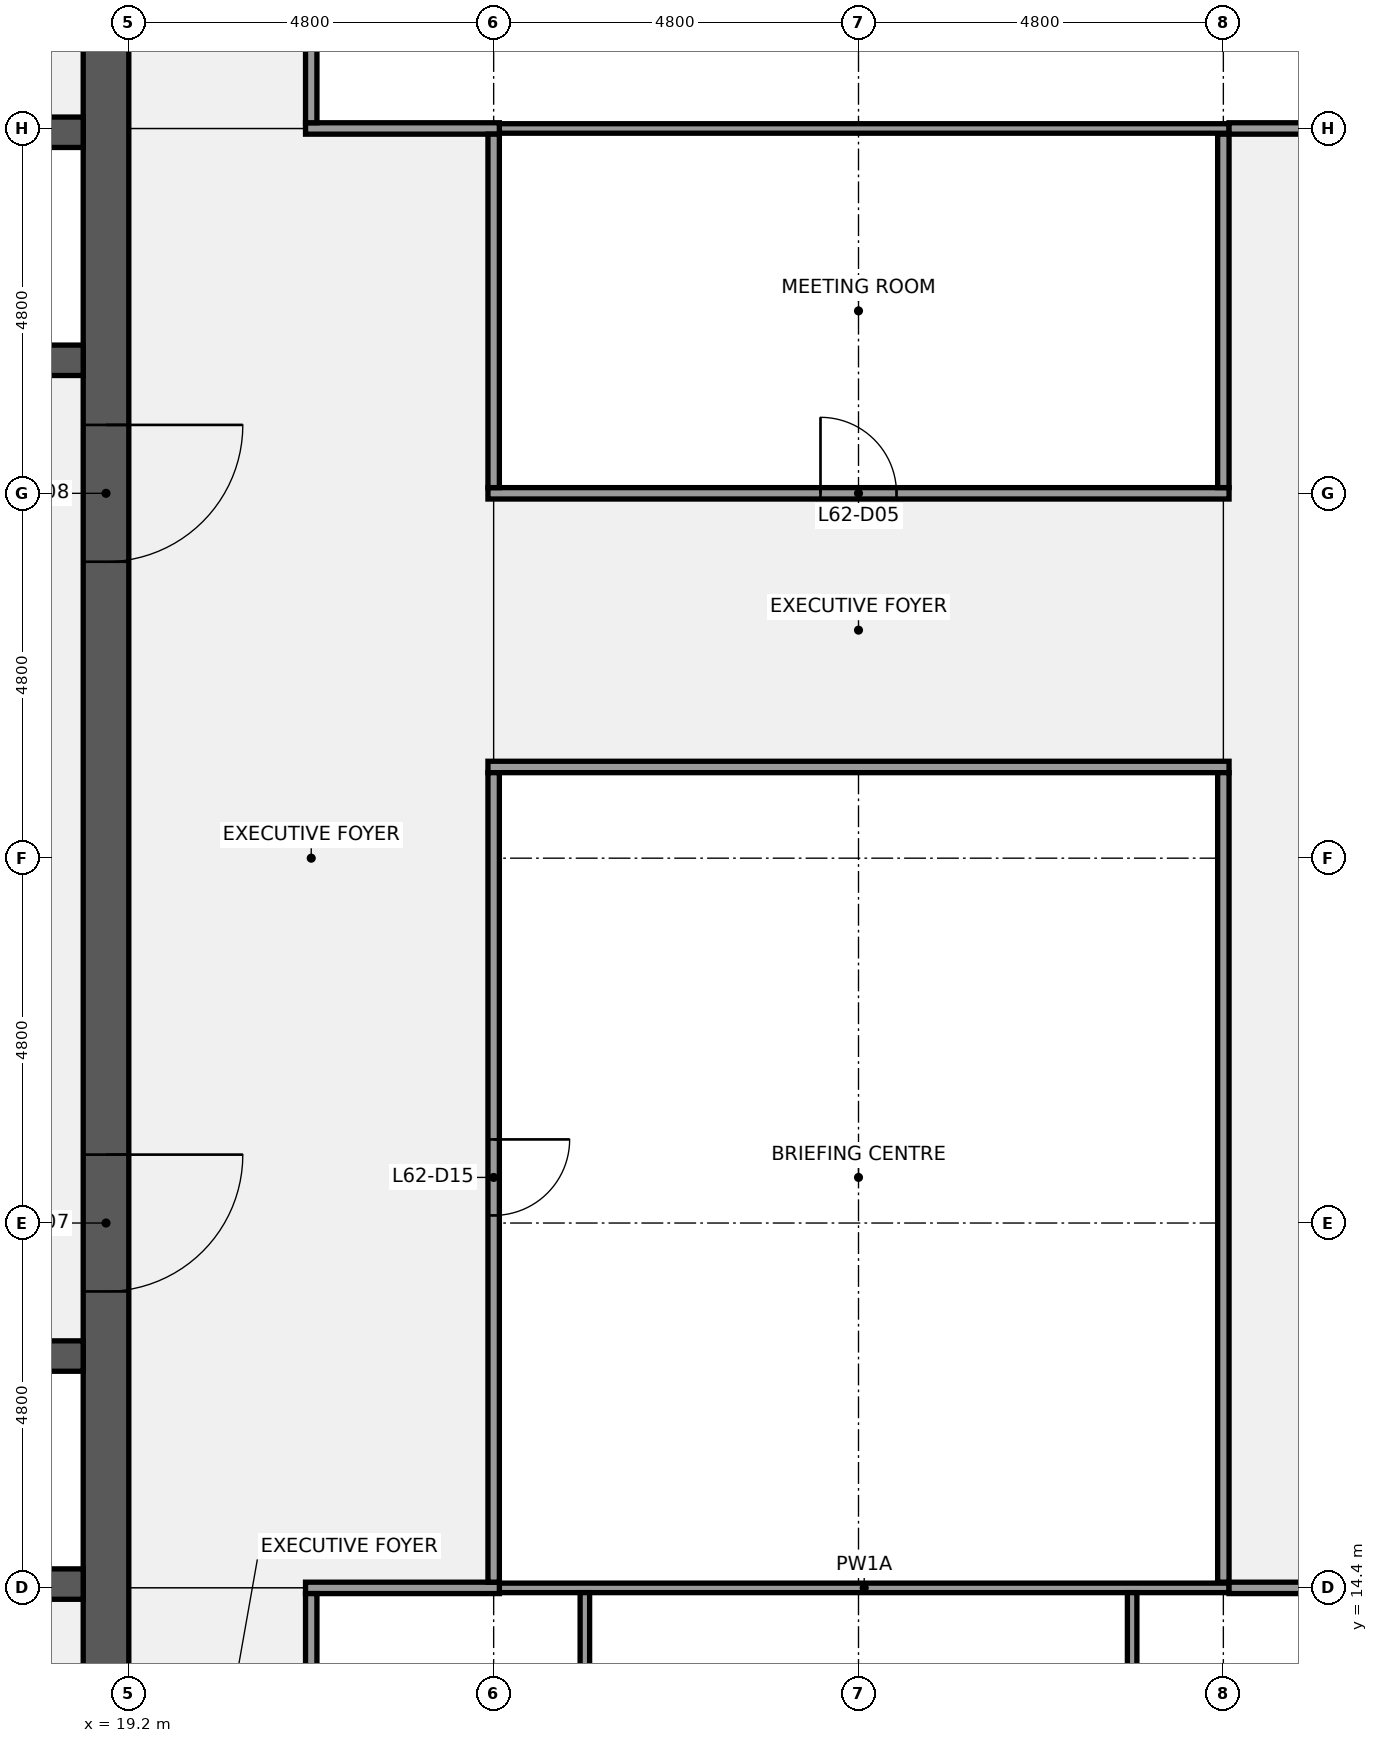
"""IFC4 building model, lengths in metres.
Left out: names, types, materials, properties, quantities, classifications, styles, units other than length and angle.
Written with IfcOpenShell. Run it as: python <this file> out.ifc"""

import sys

from ifc_helpers import new_model, si_unit, direction, frame, frame_2d, origin, place, context, subcontext, project, spatial, rectangle, extrude, element, fill, save


model = new_model("IFC4")
c1 = context("Model", 3, precision=1e-05, world=origin(), true_north=direction((0.0, 1.0)))
c2 = subcontext(c1, "Body", "Model", "MODEL_VIEW")
j1 = project(units=[si_unit("LENGTHUNIT", "METRE"), si_unit("PLANEANGLEUNIT", "RADIAN")], contexts=[c1])
p1 = place(None, origin())
s1 = spatial("IfcSite", under=j1, at=p1, CompositionType="ELEMENT")
p2 = place(p1, origin())
s2 = spatial("IfcBuilding", under=s1, at=p2, CompositionType="ELEMENT")
p3 = place(p2, frame((0.0, 0.0, 286.3)))
s3 = spatial("IfcBuildingStorey", under=s2, at=p3, CompositionType="ELEMENT", Elevation=286.3)
p4 = place(p3, frame((18.9, 38.4, 0.0), z_axis=(0.0, 0.0, 1.0), x_axis=(0.0, -1.0, 0.0)))
e1 = element("IfcWall", 1, at=p4, inside=s3, PredefinedType="SHEAR", context=c2, shape_type="SweptSolid", body=[
    extrude(rectangle(XDim=28.8, YDim=0.6, at=frame_2d((14.4, 0.0))), origin(), (0.0, 0.0, 1.0), 3.84),
])
p5 = place(p4, frame((18.3, 0.0, 0.0)))
e2 = element("IfcOpeningElement", 2, at=p5, cuts=e1, PredefinedType="OPENING", context=c2, shape_type="SweptSolid", body=[
    extrude(rectangle(XDim=1.8, YDim=2.1, at=frame_2d((0.9, 1.05))), frame((0.0, 0.31, 0.0), z_axis=(0.0, -1.0, 0.0), x_axis=(1.0, 0.0, 0.0)), (0.0, 0.0, 1.0), 0.62),
])
p6 = place(p4, frame((8.7, 0.0, 0.0)))
e3 = element("IfcOpeningElement", 3, at=p6, cuts=e1, PredefinedType="OPENING", context=c2, shape_type="SweptSolid", body=[
    extrude(rectangle(XDim=1.8, YDim=2.1, at=frame_2d((0.9, 1.05))), frame((0.0, 0.31, 0.0), z_axis=(0.0, -1.0, 0.0), x_axis=(1.0, 0.0, 0.0)), (0.0, 0.0, 1.0), 0.62),
])
p7 = place(p3, frame((0.6, 14.45, 0.0), z_axis=(0.0, 0.0, 1.0), x_axis=(1.0, 0.0, 0.0)))
e4 = element("IfcWall", 4, at=p7, inside=s3, PredefinedType="SHEAR", context=c2, shape_type="SweptSolid", body=[
    extrude(rectangle(XDim=18.0, YDim=0.4, at=frame_2d((9.0, 0.0))), origin(), (0.0, 0.0, 1.0), 3.84),
])
p8 = place(p3, frame((0.6, 17.45, 0.0), z_axis=(0.0, 0.0, 1.0), x_axis=(1.0, 0.0, 0.0)))
e5 = element("IfcWall", 5, at=p8, inside=s3, PredefinedType="SHEAR", context=c2, shape_type="SweptSolid", body=[
    extrude(rectangle(XDim=18.0, YDim=0.4, at=frame_2d((9.0, 0.0))), origin(), (0.0, 0.0, 1.0), 3.84),
])
p9 = place(p8, frame((1.863, 0.0, 0.0)))
e6 = element("IfcOpeningElement", 6, at=p9, cuts=e5, PredefinedType="OPENING", context=c2, shape_type="SweptSolid", body=[
    extrude(rectangle(XDim=1.0, YDim=2.1, at=frame_2d((0.5, 1.05))), frame((0.0, 0.21, 0.0), z_axis=(0.0, -1.0, 0.0), x_axis=(1.0, 0.0, 0.0)), (0.0, 0.0, 1.0), 0.42),
])
p10 = place(p8, frame((5.5, 0.0, 0.0)))
e7 = element("IfcOpeningElement", 7, at=p10, cuts=e5, PredefinedType="OPENING", context=c2, shape_type="SweptSolid", body=[
    extrude(rectangle(XDim=1.0, YDim=2.1, at=frame_2d((0.5, 1.05))), frame((0.0, 0.21, 0.0), z_axis=(0.0, -1.0, 0.0), x_axis=(1.0, 0.0, 0.0)), (0.0, 0.0, 1.0), 0.42),
])
p11 = place(p8, frame((9.7, 0.0, 0.0)))
e8 = element("IfcOpeningElement", 8, at=p11, cuts=e5, PredefinedType="OPENING", context=c2, shape_type="SweptSolid", body=[
    extrude(rectangle(XDim=1.0, YDim=2.1, at=frame_2d((0.5, 1.05))), frame((0.0, 0.21, 0.0), z_axis=(0.0, -1.0, 0.0), x_axis=(1.0, 0.0, 0.0)), (0.0, 0.0, 1.0), 0.42),
])
p12 = place(p8, frame((15.137, 0.0, 0.0)))
e9 = element("IfcOpeningElement", 9, at=p12, cuts=e5, PredefinedType="OPENING", context=c2, shape_type="SweptSolid", body=[
    extrude(rectangle(XDim=1.0, YDim=2.1, at=frame_2d((0.5, 1.05))), frame((0.0, 0.21, 0.0), z_axis=(0.0, -1.0, 0.0), x_axis=(1.0, 0.0, 0.0)), (0.0, 0.0, 1.0), 0.42),
])
p13 = place(p3, frame((0.6, 30.55, 0.0), z_axis=(0.0, 0.0, 1.0), x_axis=(1.0, 0.0, 0.0)))
e10 = element("IfcWall", 10, at=p13, inside=s3, PredefinedType="SHEAR", context=c2, shape_type="SweptSolid", body=[
    extrude(rectangle(XDim=18.0, YDim=0.4, at=frame_2d((9.0, 0.0))), origin(), (0.0, 0.0, 1.0), 3.84),
])
p14 = place(p13, frame((1.6, 0.0, 0.0)))
e11 = element("IfcOpeningElement", 11, at=p14, cuts=e10, PredefinedType="OPENING", context=c2, shape_type="SweptSolid", body=[
    extrude(rectangle(XDim=1.2, YDim=2.1, at=frame_2d((0.6, 1.05))), frame((0.0, 0.21, 0.0), z_axis=(0.0, -1.0, 0.0), x_axis=(1.0, 0.0, 0.0)), (0.0, 0.0, 1.0), 0.42),
])
p15 = place(p13, frame((4.2, 0.0, 0.0)))
e12 = element("IfcOpeningElement", 12, at=p15, cuts=e10, PredefinedType="OPENING", context=c2, shape_type="SweptSolid", body=[
    extrude(rectangle(XDim=1.2, YDim=2.1, at=frame_2d((0.6, 1.05))), frame((0.0, 0.21, 0.0), z_axis=(0.0, -1.0, 0.0), x_axis=(1.0, 0.0, 0.0)), (0.0, 0.0, 1.0), 0.42),
])
p16 = place(p13, frame((6.8, 0.0, 0.0)))
e13 = element("IfcOpeningElement", 13, at=p16, cuts=e10, PredefinedType="OPENING", context=c2, shape_type="SweptSolid", body=[
    extrude(rectangle(XDim=1.2, YDim=2.1, at=frame_2d((0.6, 1.05))), frame((0.0, 0.21, 0.0), z_axis=(0.0, -1.0, 0.0), x_axis=(1.0, 0.0, 0.0)), (0.0, 0.0, 1.0), 0.42),
])
p17 = place(p13, frame((10.0, 0.0, 0.0)))
e14 = element("IfcOpeningElement", 14, at=p17, cuts=e10, PredefinedType="OPENING", context=c2, shape_type="SweptSolid", body=[
    extrude(rectangle(XDim=1.2, YDim=2.1, at=frame_2d((0.6, 1.05))), frame((0.0, 0.21, 0.0), z_axis=(0.0, -1.0, 0.0), x_axis=(1.0, 0.0, 0.0)), (0.0, 0.0, 1.0), 0.42),
])
p18 = place(p13, frame((12.6, 0.0, 0.0)))
e15 = element("IfcOpeningElement", 15, at=p18, cuts=e10, PredefinedType="OPENING", context=c2, shape_type="SweptSolid", body=[
    extrude(rectangle(XDim=1.2, YDim=2.1, at=frame_2d((0.6, 1.05))), frame((0.0, 0.21, 0.0), z_axis=(0.0, -1.0, 0.0), x_axis=(1.0, 0.0, 0.0)), (0.0, 0.0, 1.0), 0.42),
])
p19 = place(p13, frame((15.2, 0.0, 0.0)))
e16 = element("IfcOpeningElement", 16, at=p19, cuts=e10, PredefinedType="OPENING", context=c2, shape_type="SweptSolid", body=[
    extrude(rectangle(XDim=1.2, YDim=2.1, at=frame_2d((0.6, 1.05))), frame((0.0, 0.21, 0.0), z_axis=(0.0, -1.0, 0.0), x_axis=(1.0, 0.0, 0.0)), (0.0, 0.0, 1.0), 0.42),
])
p20 = place(p3, frame((0.6, 33.55, 0.0), z_axis=(0.0, 0.0, 1.0), x_axis=(1.0, 0.0, 0.0)))
e17 = element("IfcWall", 17, at=p20, inside=s3, PredefinedType="SHEAR", context=c2, shape_type="SweptSolid", body=[
    extrude(rectangle(XDim=18.0, YDim=0.4, at=frame_2d((9.0, 0.0))), origin(), (0.0, 0.0, 1.0), 3.84),
])
p21 = place(p3, frame((24.075, 14.4, 0.0), z_axis=(0.0, 0.0, 1.0), x_axis=(1.0, 0.0, 0.0)))
e18 = element("IfcWall", 18, at=p21, inside=s3, PredefinedType="PARTITIONING", context=c2, shape_type="SweptSolid", body=[
    extrude(rectangle(XDim=9.6, YDim=0.125, at=frame_2d((4.8, 0.0))), origin(), (0.0, 0.0, 1.0), 2.849),
])
p22 = place(p3, frame((21.525, 14.4, 0.0), z_axis=(0.0, 0.0, 1.0), x_axis=(1.0, 0.0, 0.0)))
e19 = element("IfcWall", 19, at=p22, inside=s3, PredefinedType="PARTITIONING", context=c2, shape_type="SweptSolid", body=[
    extrude(rectangle(XDim=2.55, YDim=0.15, at=frame_2d((1.275, 0.0))), origin(), (0.0, 0.0, 1.0), 2.849),
])
p23 = place(p3, frame((33.675, 14.4, 0.0), z_axis=(0.0, 0.0, 1.0), x_axis=(1.0, 0.0, 0.0)))
e20 = element("IfcWall", 20, at=p23, inside=s3, PredefinedType="PARTITIONING", context=c2, shape_type="SweptSolid", body=[
    extrude(rectangle(XDim=2.4, YDim=0.15, at=frame_2d((1.2, 0.0))), origin(), (0.0, 0.0, 1.0), 2.849),
])
p24 = place(p3, frame((23.925, 25.2, 0.0), z_axis=(0.0, 0.0, 1.0), x_axis=(1.0, 0.0, 0.0)))
e21 = element("IfcWall", 21, at=p24, inside=s3, PredefinedType="PARTITIONING", context=c2, shape_type="SweptSolid", body=[
    extrude(rectangle(XDim=9.75, YDim=0.15, at=frame_2d((4.875, 0.0))), origin(), (0.0, 0.0, 1.0), 2.849),
])
p25 = place(p3, frame((23.925, 28.8, 0.0), z_axis=(0.0, 0.0, 1.0), x_axis=(1.0, 0.0, 0.0)))
e22 = element("IfcWall", 22, at=p25, inside=s3, PredefinedType="PARTITIONING", context=c2, shape_type="SweptSolid", body=[
    extrude(rectangle(XDim=9.75, YDim=0.15, at=frame_2d((4.875, 0.0))), origin(), (0.0, 0.0, 1.0), 2.849),
])
p26 = place(p25, frame((4.375, 0.0, 0.0)))
e23 = element("IfcOpeningElement", 23, at=p26, cuts=e22, PredefinedType="OPENING", context=c2, shape_type="SweptSolid", body=[
    extrude(rectangle(XDim=1.0, YDim=2.1, at=frame_2d((0.5, 1.05))), frame((0.0, 0.085, 0.0), z_axis=(0.0, -1.0, 0.0), x_axis=(1.0, 0.0, 0.0)), (0.0, 0.0, 1.0), 0.17),
])
p27 = place(p3, frame((24.075, 33.6, 0.0), z_axis=(0.0, 0.0, 1.0), x_axis=(1.0, 0.0, 0.0)))
e24 = element("IfcWall", 24, at=p27, inside=s3, PredefinedType="PARTITIONING", context=c2, shape_type="SweptSolid", body=[
    extrude(rectangle(XDim=9.6, YDim=0.125, at=frame_2d((4.8, 0.0))), origin(), (0.0, 0.0, 1.0), 2.849),
])
p28 = place(p3, frame((21.525, 33.6, 0.0), z_axis=(0.0, 0.0, 1.0), x_axis=(1.0, 0.0, 0.0)))
e25 = element("IfcWall", 25, at=p28, inside=s3, PredefinedType="PARTITIONING", context=c2, shape_type="SweptSolid", body=[
    extrude(rectangle(XDim=2.55, YDim=0.15, at=frame_2d((1.275, 0.0))), origin(), (0.0, 0.0, 1.0), 2.849),
])
p29 = place(p3, frame((33.675, 33.6, 0.0), z_axis=(0.0, 0.0, 1.0), x_axis=(1.0, 0.0, 0.0)))
e26 = element("IfcWall", 26, at=p29, inside=s3, PredefinedType="PARTITIONING", context=c2, shape_type="SweptSolid", body=[
    extrude(rectangle(XDim=2.4, YDim=0.15, at=frame_2d((1.2, 0.0))), origin(), (0.0, 0.0, 1.0), 2.849),
])
p30 = place(p3, frame((21.6, 9.675, 0.0), z_axis=(0.0, 0.0, 1.0), x_axis=(0.0, 1.0, 0.0)))
e27 = element("IfcWall", 27, at=p30, inside=s3, PredefinedType="PARTITIONING", context=c2, shape_type="SweptSolid", body=[
    extrude(rectangle(XDim=4.65, YDim=0.15, at=frame_2d((2.325, 0.0))), origin(), (0.0, 0.0, 1.0), 2.849),
])
p31 = place(p30, frame((1.825, 0.0, 0.0)))
e28 = element("IfcOpeningElement", 28, at=p31, cuts=e27, PredefinedType="OPENING", context=c2, shape_type="SweptSolid", body=[
    extrude(rectangle(XDim=1.0, YDim=2.1, at=frame_2d((0.5, 1.05))), frame((0.0, 0.085, 0.0), z_axis=(0.0, -1.0, 0.0), x_axis=(1.0, 0.0, 0.0)), (0.0, 0.0, 1.0), 0.17),
])
p32 = place(p3, frame((21.6, 33.675, 0.0), z_axis=(0.0, 0.0, 1.0), x_axis=(0.0, 1.0, 0.0)))
e29 = element("IfcWall", 29, at=p32, inside=s3, PredefinedType="PARTITIONING", context=c2, shape_type="SweptSolid", body=[
    extrude(rectangle(XDim=4.65, YDim=0.15, at=frame_2d((2.325, 0.0))), origin(), (0.0, 0.0, 1.0), 2.849),
])
p33 = place(p3, frame((24.0, 14.475, 0.0), z_axis=(0.0, 0.0, 1.0), x_axis=(0.0, 1.0, 0.0)))
e30 = element("IfcWall", 30, at=p33, inside=s3, PredefinedType="PARTITIONING", context=c2, shape_type="SweptSolid", body=[
    extrude(rectangle(XDim=10.65, YDim=0.15, at=frame_2d((5.325, 0.0))), origin(), (0.0, 0.0, 1.0), 2.849),
])
p34 = place(p33, frame((4.825, 0.0, 0.0)))
e31 = element("IfcOpeningElement", 31, at=p34, cuts=e30, PredefinedType="OPENING", context=c2, shape_type="SweptSolid", body=[
    extrude(rectangle(XDim=1.0, YDim=2.1, at=frame_2d((0.5, 1.05))), frame((0.0, 0.085, 0.0), z_axis=(0.0, -1.0, 0.0), x_axis=(1.0, 0.0, 0.0)), (0.0, 0.0, 1.0), 0.17),
])
p35 = place(p3, frame((24.0, 28.875, 0.0), z_axis=(0.0, 0.0, 1.0), x_axis=(0.0, 1.0, 0.0)))
e32 = element("IfcWall", 32, at=p35, inside=s3, PredefinedType="PARTITIONING", context=c2, shape_type="SweptSolid", body=[
    extrude(rectangle(XDim=4.65, YDim=0.15, at=frame_2d((2.325, 0.0))), origin(), (0.0, 0.0, 1.0), 2.849),
])
for number, where, z_axis, x_axis in (
    (33, (25.2, 9.675, 0.0), (0.0, 0.0, 1.0), (0.0, 1.0, 0.0)),
    (34, (32.4, 9.675, 0.0), (0.0, 0.0, 1.0), (0.0, 1.0, 0.0)),
):
    element("IfcWall", number, at=place(p3, frame(where, z_axis=z_axis, x_axis=x_axis)), inside=s3, PredefinedType="PARTITIONING", context=c2, shape_type="SweptSolid", body=[
        extrude(rectangle(XDim=4.662, YDim=0.125, at=frame_2d((2.331, 0.0))), origin(), (0.0, 0.0, 1.0), 2.849),
    ])
p36 = place(p3, frame((33.6, 14.475, 0.0), z_axis=(0.0, 0.0, 1.0), x_axis=(0.0, 1.0, 0.0)))
e35 = element("IfcWall", 35, at=p36, inside=s3, PredefinedType="PARTITIONING", context=c2, shape_type="SweptSolid", body=[
    extrude(rectangle(XDim=10.65, YDim=0.15, at=frame_2d((5.325, 0.0))), origin(), (0.0, 0.0, 1.0), 2.849),
])
p37 = place(p3, frame((33.6, 28.875, 0.0), z_axis=(0.0, 0.0, 1.0), x_axis=(0.0, 1.0, 0.0)))
e36 = element("IfcWall", 36, at=p37, inside=s3, PredefinedType="PARTITIONING", context=c2, shape_type="SweptSolid", body=[
    extrude(rectangle(XDim=4.65, YDim=0.15, at=frame_2d((2.325, 0.0))), origin(), (0.0, 0.0, 1.0), 2.849),
])
p38 = place(p5, origin())
e37 = element("IfcDoor", 37, at=p38, inside=s3, OperationType="DOUBLE_DOOR_SINGLE_SWING", PredefinedType="DOOR", context=c2, shape_type="SweptSolid", body=[
    extrude(rectangle(XDim=1.8, YDim=2.1, at=frame_2d((0.9, 1.05))), frame((0.0, 0.025, 0.0), z_axis=(0.0, -1.0, 0.0), x_axis=(1.0, 0.0, 0.0)), (0.0, 0.0, 1.0), 0.05),
])
fill(e2, e37)
p39 = place(p6, origin())
e38 = element("IfcDoor", 38, at=p39, inside=s3, OperationType="DOUBLE_DOOR_SINGLE_SWING", PredefinedType="DOOR", context=c2, shape_type="SweptSolid", body=[
    extrude(rectangle(XDim=1.8, YDim=2.1, at=frame_2d((0.9, 1.05))), frame((0.0, 0.025, 0.0), z_axis=(0.0, -1.0, 0.0), x_axis=(1.0, 0.0, 0.0)), (0.0, 0.0, 1.0), 0.05),
])
fill(e3, e38)
p40 = place(p26, origin())
e39 = element("IfcDoor", 39, at=p40, inside=s3, OperationType="SINGLE_SWING_LEFT", PredefinedType="DOOR", context=c2, shape_type="SweptSolid", body=[
    extrude(rectangle(XDim=1.0, YDim=2.1, at=frame_2d((0.5, 1.05))), frame((0.0, 0.025, 0.0), z_axis=(0.0, -1.0, 0.0), x_axis=(1.0, 0.0, 0.0)), (0.0, 0.0, 1.0), 0.05),
])
fill(e23, e39)
p41 = place(p34, origin())
e40 = element("IfcDoor", 40, at=p41, inside=s3, OperationType="SINGLE_SWING_RIGHT", PredefinedType="DOOR", context=c2, shape_type="SweptSolid", body=[
    extrude(rectangle(XDim=1.0, YDim=2.1, at=frame_2d((0.5, 1.05))), frame((0.0, 0.025, 0.0), z_axis=(0.0, -1.0, 0.0), x_axis=(1.0, 0.0, 0.0)), (0.0, 0.0, 1.0), 0.05),
])
fill(e31, e40)
save(model, sys.argv[1])
